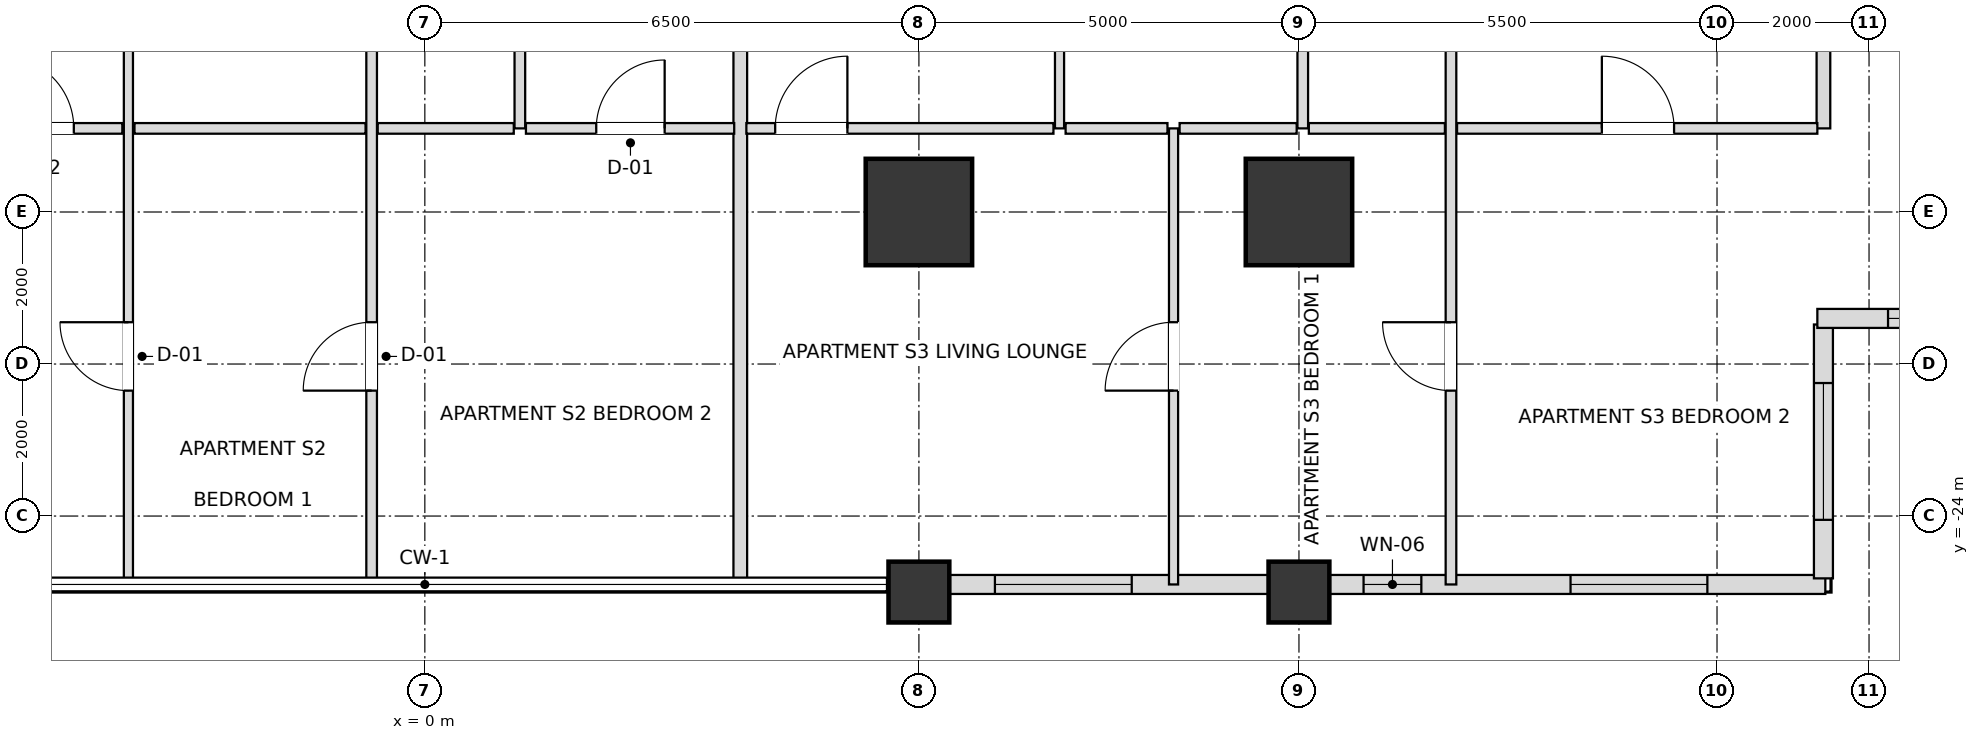
"""IFC4 building model, lengths in metres.
Left out: names, types, materials, properties, quantities, classifications, styles, units other than length and angle.
Written with IfcOpenShell. Run it as: python <this file> out.ifc"""

import sys

from ifc_helpers import new_model, si_unit, direction, frame, frame_2d, origin, origin_2d, place, context, subcontext, project, spatial, rectangle, extrude, element, fill, save


model = new_model("IFC4")
c1 = context("Model", 3, precision=1e-05, world=origin(), true_north=direction((0.0, 1.0)))
c2 = subcontext(c1, "Body", "Model", "MODEL_VIEW")
j1 = project(units=[si_unit("LENGTHUNIT", "METRE"), si_unit("PLANEANGLEUNIT", "RADIAN")], contexts=[c1])
p1 = place(None, origin())
s1 = spatial("IfcSite", under=j1, at=p1, CompositionType="ELEMENT")
p2 = place(p1, origin())
s2 = spatial("IfcBuilding", under=s1, at=p2, CompositionType="ELEMENT")
p3 = place(p2, frame((0.0, 0.0, 32.4)))
s3 = spatial("IfcBuildingStorey", under=s2, at=p3, CompositionType="ELEMENT", Elevation=32.4)
for number, where, z_axis, x_axis in (
    (1, (6.5, -20.0, 0.0), (0.0, 0.0, 1.0), (1.0, 0.0, 0.0)),
    (2, (11.5, -20.0, 0.0), (0.0, 0.0, 1.0), (1.0, 0.0, 0.0)),
):
    element("IfcColumn", number, at=place(p3, frame(where, z_axis=z_axis, x_axis=x_axis)), inside=s3, PredefinedType="USERDEFINED", context=c2, shape_type="SweptSolid", body=[
        extrude(rectangle(XDim=1.4, YDim=1.4, at=origin_2d()), origin(), (0.0, 0.0, 1.0), 3.6),
    ])
for number, where, z_axis, x_axis in (
    (3, (6.5, -25.0, 0.0), (0.0, 0.0, 1.0), (1.0, 0.0, 0.0)),
    (4, (11.5, -25.0, 0.0), (0.0, 0.0, 1.0), (1.0, 0.0, 0.0)),
):
    element("IfcColumn", number, at=place(p3, frame(where, z_axis=z_axis, x_axis=x_axis)), inside=s3, PredefinedType="COLUMN", context=c2, shape_type="SweptSolid", body=[
        extrude(rectangle(XDim=0.8, YDim=0.8, at=origin_2d()), origin(), (0.0, 0.0, 1.0), 3.6),
    ])
p4 = place(p3, frame((6.895, -24.9, 0.0), z_axis=(0.0, 0.0, 1.0), x_axis=(1.0, 0.0, 0.0)))
e5 = element("IfcWall", 5, at=p4, inside=s3, PredefinedType="SOLIDWALL", context=c2, shape_type="SweptSolid", body=[
    extrude(rectangle(XDim=4.21, YDim=0.25, at=frame_2d((2.105, 0.0))), origin(), (0.0, 0.0, 1.0), 2.736),
])
p5 = place(p4, frame((0.605, 0.0, 0.72)))
e6 = element("IfcOpeningElement", 6, at=p5, cuts=e5, PredefinedType="OPENING", context=c2, shape_type="SweptSolid", body=[
    extrude(rectangle(XDim=1.8, YDim=1.68, at=frame_2d((0.9, 0.84))), frame((0.0, 0.135, 0.0), z_axis=(0.0, -1.0, 0.0), x_axis=(1.0, 0.0, 0.0)), (0.0, 0.0, 1.0), 0.27),
])
p6 = place(p3, frame((11.895, -24.9, 0.0), z_axis=(0.0, 0.0, 1.0), x_axis=(1.0, 0.0, 0.0)))
e7 = element("IfcWall", 7, at=p6, inside=s3, PredefinedType="SOLIDWALL", context=c2, shape_type="SweptSolid", body=[
    extrude(rectangle(XDim=6.53, YDim=0.25, at=frame_2d((3.265, 0.0))), origin(), (0.0, 0.0, 1.0), 2.736),
])
p7 = place(p6, frame((0.455, 0.0, 0.72)))
e8 = element("IfcOpeningElement", 8, at=p7, cuts=e7, PredefinedType="OPENING", context=c2, shape_type="SweptSolid", body=[
    extrude(rectangle(XDim=0.76, YDim=1.68, at=frame_2d((0.38, 0.84))), frame((0.0, 0.135, 0.0), z_axis=(0.0, -1.0, 0.0), x_axis=(1.0, 0.0, 0.0)), (0.0, 0.0, 1.0), 0.27),
])
p8 = place(p6, frame((3.178, 0.0, 0.72)))
e9 = element("IfcOpeningElement", 9, at=p8, cuts=e7, PredefinedType="OPENING", context=c2, shape_type="SweptSolid", body=[
    extrude(rectangle(XDim=1.8, YDim=1.68, at=frame_2d((0.9, 0.84))), frame((0.0, 0.135, 0.0), z_axis=(0.0, -1.0, 0.0), x_axis=(1.0, 0.0, 0.0)), (0.0, 0.0, 1.0), 0.27),
])
p9 = place(p3, frame((18.4, -24.82, 0.0), z_axis=(0.0, 0.0, 1.0), x_axis=(0.0, 1.0, 0.0)))
e10 = element("IfcWall", 10, at=p9, inside=s3, PredefinedType="SOLIDWALL", context=c2, shape_type="SweptSolid", body=[
    extrude(rectangle(XDim=3.34, YDim=0.25, at=frame_2d((1.67, 0.0))), origin(), (0.0, 0.0, 1.0), 2.736),
])
p10 = place(p9, frame((0.77, 0.0, 0.72)))
e11 = element("IfcOpeningElement", 11, at=p10, cuts=e10, PredefinedType="OPENING", context=c2, shape_type="SweptSolid", body=[
    extrude(rectangle(XDim=1.8, YDim=1.68, at=frame_2d((0.9, 0.84))), frame((0.0, 0.135, 0.0), z_axis=(0.0, -1.0, 0.0), x_axis=(1.0, 0.0, 0.0)), (0.0, 0.0, 1.0), 0.27),
])
p11 = place(p3, frame((18.32, -21.4, 0.0), z_axis=(0.0, 0.0, 1.0), x_axis=(1.0, 0.0, 0.0)))
e12 = element("IfcWall", 12, at=p11, inside=s3, PredefinedType="SOLIDWALL", context=c2, shape_type="SweptSolid", body=[
    extrude(rectangle(XDim=3.66, YDim=0.25, at=frame_2d((1.83, 0.0))), origin(), (0.0, 0.0, 1.0), 2.736),
])
p12 = place(p11, frame((0.93, 0.0, 0.72)))
e13 = element("IfcOpeningElement", 13, at=p12, cuts=e12, PredefinedType="OPENING", context=c2, shape_type="SweptSolid", body=[
    extrude(rectangle(XDim=1.8, YDim=1.68, at=frame_2d((0.9, 0.84))), frame((0.0, 0.135, 0.0), z_axis=(0.0, -1.0, 0.0), x_axis=(1.0, 0.0, 0.0)), (0.0, 0.0, 1.0), 0.27),
])
p13 = place(p3, frame((-3.9, -24.9, 0.0), z_axis=(0.0, 0.0, 1.0), x_axis=(0.0, 1.0, 0.0)))
e14 = element("IfcWall", 14, at=p13, inside=s3, PredefinedType="PARTITIONING", context=c2, shape_type="SweptSolid", body=[
    extrude(rectangle(XDim=15.6, YDim=0.12, at=frame_2d((7.8, 0.0))), origin(), (0.0, 0.0, 1.0), 2.816),
])
p14 = place(p13, frame((10.325, 0.0, 0.0)))
e15 = element("IfcOpeningElement", 15, at=p14, cuts=e14, PredefinedType="OPENING", context=c2, shape_type="SweptSolid", body=[
    extrude(rectangle(XDim=0.95, YDim=2.1, at=frame_2d((0.475, 1.05))), frame((0.0, 0.07, 0.0), z_axis=(0.0, -1.0, 0.0), x_axis=(1.0, 0.0, 0.0)), (0.0, 0.0, 1.0), 0.14),
])
p15 = place(p13, frame((2.55, 0.0, 0.0)))
e16 = element("IfcOpeningElement", 16, at=p15, cuts=e14, PredefinedType="OPENING", context=c2, shape_type="SweptSolid", body=[
    extrude(rectangle(XDim=0.9, YDim=2.1, at=frame_2d((0.45, 1.05))), frame((0.0, 0.07, 0.0), z_axis=(0.0, -1.0, 0.0), x_axis=(1.0, 0.0, 0.0)), (0.0, 0.0, 1.0), 0.14),
])
p16 = place(p3, frame((-0.7, -24.9, 0.0), z_axis=(0.0, 0.0, 1.0), x_axis=(0.0, 1.0, 0.0)))
e17 = element("IfcWall", 17, at=p16, inside=s3, PredefinedType="PARTITIONING", context=c2, shape_type="SweptSolid", body=[
    extrude(rectangle(XDim=15.6, YDim=0.14, at=frame_2d((7.8, 0.0))), origin(), (0.0, 0.0, 1.0), 2.816),
])
p17 = place(p16, frame((10.35, 0.0, 0.0)))
e18 = element("IfcOpeningElement", 18, at=p17, cuts=e17, PredefinedType="OPENING", context=c2, shape_type="SweptSolid", body=[
    extrude(rectangle(XDim=0.9, YDim=2.1, at=frame_2d((0.45, 1.05))), frame((0.0, 0.08, 0.0), z_axis=(0.0, -1.0, 0.0), x_axis=(1.0, 0.0, 0.0)), (0.0, 0.0, 1.0), 0.16),
])
p18 = place(p16, frame((2.55, 0.0, 0.0)))
e19 = element("IfcOpeningElement", 19, at=p18, cuts=e17, PredefinedType="OPENING", context=c2, shape_type="SweptSolid", body=[
    extrude(rectangle(XDim=0.9, YDim=2.1, at=frame_2d((0.45, 1.05))), frame((0.0, 0.08, 0.0), z_axis=(0.0, -1.0, 0.0), x_axis=(1.0, 0.0, 0.0)), (0.0, 0.0, 1.0), 0.16),
])
p19 = place(p3, frame((1.25, -18.9, 0.0), z_axis=(0.0, 0.0, 1.0), x_axis=(0.0, 1.0, 0.0)))
e20 = element("IfcWall", 20, at=p19, inside=s3, PredefinedType="PARTITIONING", context=c2, shape_type="SweptSolid", body=[
    extrude(rectangle(XDim=9.6, YDim=0.14, at=frame_2d((4.8, 0.0))), origin(), (0.0, 0.0, 1.0), 2.948),
])
p20 = place(p3, frame((4.15, -24.9, 0.0), z_axis=(0.0, 0.0, 1.0), x_axis=(0.0, 1.0, 0.0)))
e21 = element("IfcWall", 21, at=p20, inside=s3, PredefinedType="PARTITIONING", context=c2, shape_type="SweptSolid", body=[
    extrude(rectangle(XDim=15.6, YDim=0.18, at=frame_2d((7.8, 0.0))), origin(), (0.0, 0.0, 1.0), 2.816),
])
p21 = place(p3, frame((8.35, -18.9, 0.0), z_axis=(0.0, 0.0, 1.0), x_axis=(0.0, 1.0, 0.0)))
e22 = element("IfcWall", 22, at=p21, inside=s3, PredefinedType="PARTITIONING", context=c2, shape_type="SweptSolid", body=[
    extrude(rectangle(XDim=9.6, YDim=0.12, at=frame_2d((4.8, 0.0))), origin(), (0.0, 0.0, 1.0), 2.816),
])
p22 = place(p21, frame((4.325, 0.0, 0.0)))
e23 = element("IfcOpeningElement", 23, at=p22, cuts=e22, PredefinedType="OPENING", context=c2, shape_type="SweptSolid", body=[
    extrude(rectangle(XDim=0.95, YDim=2.1, at=frame_2d((0.475, 1.05))), frame((0.0, 0.07, 0.0), z_axis=(0.0, -1.0, 0.0), x_axis=(1.0, 0.0, 0.0)), (0.0, 0.0, 1.0), 0.14),
])
p23 = place(p3, frame((9.85, -24.9, 0.0), z_axis=(0.0, 0.0, 1.0), x_axis=(0.0, 1.0, 0.0)))
e24 = element("IfcWall", 24, at=p23, inside=s3, PredefinedType="PARTITIONING", context=c2, shape_type="SweptSolid", body=[
    extrude(rectangle(XDim=6.0, YDim=0.12, at=frame_2d((3.0, 0.0))), origin(), (0.0, 0.0, 1.0), 2.816),
])
p24 = place(p23, frame((2.55, 0.0, 0.0)))
e25 = element("IfcOpeningElement", 25, at=p24, cuts=e24, PredefinedType="OPENING", context=c2, shape_type="SweptSolid", body=[
    extrude(rectangle(XDim=0.9, YDim=2.1, at=frame_2d((0.45, 1.05))), frame((0.0, 0.07, 0.0), z_axis=(0.0, -1.0, 0.0), x_axis=(1.0, 0.0, 0.0)), (0.0, 0.0, 1.0), 0.14),
])
p25 = place(p3, frame((11.55, -18.9, 0.0), z_axis=(0.0, 0.0, 1.0), x_axis=(0.0, 1.0, 0.0)))
e26 = element("IfcWall", 26, at=p25, inside=s3, PredefinedType="PARTITIONING", context=c2, shape_type="SweptSolid", body=[
    extrude(rectangle(XDim=9.6, YDim=0.14, at=frame_2d((4.8, 0.0))), origin(), (0.0, 0.0, 1.0), 2.736),
])
p26 = place(p25, frame((4.35, 0.0, 0.0)))
e27 = element("IfcOpeningElement", 27, at=p26, cuts=e26, PredefinedType="OPENING", context=c2, shape_type="SweptSolid", body=[
    extrude(rectangle(XDim=0.9, YDim=2.1, at=frame_2d((0.45, 1.05))), frame((0.0, 0.08, 0.0), z_axis=(0.0, -1.0, 0.0), x_axis=(1.0, 0.0, 0.0)), (0.0, 0.0, 1.0), 0.16),
])
p27 = place(p3, frame((13.5, -24.9, 0.0), z_axis=(0.0, 0.0, 1.0), x_axis=(0.0, 1.0, 0.0)))
e28 = element("IfcWall", 28, at=p27, inside=s3, PredefinedType="PARTITIONING", context=c2, shape_type="SweptSolid", body=[
    extrude(rectangle(XDim=15.6, YDim=0.14, at=frame_2d((7.8, 0.0))), origin(), (0.0, 0.0, 1.0), 2.736),
])
p28 = place(p27, frame((2.55, 0.0, 0.0)))
e29 = element("IfcOpeningElement", 29, at=p28, cuts=e28, PredefinedType="OPENING", context=c2, shape_type="SweptSolid", body=[
    extrude(rectangle(XDim=0.9, YDim=2.1, at=frame_2d((0.45, 1.05))), frame((0.0, 0.08, 0.0), z_axis=(0.0, -1.0, 0.0), x_axis=(1.0, 0.0, 0.0)), (0.0, 0.0, 1.0), 0.16),
])
p29 = place(p3, frame((18.4, -18.9, 0.0), z_axis=(0.0, 0.0, 1.0), x_axis=(0.0, 1.0, 0.0)))
e30 = element("IfcWall", 30, at=p29, inside=s3, PredefinedType="PARTITIONING", context=c2, shape_type="SweptSolid", body=[
    extrude(rectangle(XDim=9.6, YDim=0.18, at=frame_2d((4.8, 0.0))), origin(), (0.0, 0.0, 1.0), 2.736),
])
p30 = place(p3, frame((-8.02, -18.9, 0.0), z_axis=(0.0, 0.0, 1.0), x_axis=(1.0, 0.0, 0.0)))
e31 = element("IfcWall", 31, at=p30, inside=s3, PredefinedType="PARTITIONING", context=c2, shape_type="SweptSolid", body=[
    extrude(rectangle(XDim=4.04, YDim=0.14, at=frame_2d((2.02, 0.0))), origin(), (0.0, 0.0, 1.0), 2.816),
])
p31 = place(p30, frame((2.452, 0.0, 0.0)))
e32 = element("IfcOpeningElement", 32, at=p31, cuts=e31, PredefinedType="OPENING", context=c2, shape_type="SweptSolid", body=[
    extrude(rectangle(XDim=0.95, YDim=2.1, at=frame_2d((0.475, 1.05))), frame((0.0, 0.08, 0.0), z_axis=(0.0, -1.0, 0.0), x_axis=(1.0, 0.0, 0.0)), (0.0, 0.0, 1.0), 0.16),
])
p32 = place(p3, frame((-3.82, -18.9, 0.0), z_axis=(0.0, 0.0, 1.0), x_axis=(1.0, 0.0, 0.0)))
e33 = element("IfcWall", 33, at=p32, inside=s3, PredefinedType="PARTITIONING", context=c2, shape_type="SweptSolid", body=[
    extrude(rectangle(XDim=3.04, YDim=0.14, at=frame_2d((1.52, 0.0))), origin(), (0.0, 0.0, 1.0), 3.38),
])
p33 = place(p3, frame((-0.62, -18.9, 0.0), z_axis=(0.0, 0.0, 1.0), x_axis=(1.0, 0.0, 0.0)))
e34 = element("IfcWall", 34, at=p33, inside=s3, PredefinedType="PARTITIONING", context=c2, shape_type="SweptSolid", body=[
    extrude(rectangle(XDim=1.79, YDim=0.14, at=frame_2d((0.895, 0.0))), origin(), (0.0, 0.0, 1.0), 3.38),
])
p34 = place(p3, frame((1.33, -18.9, 0.0), z_axis=(0.0, 0.0, 1.0), x_axis=(1.0, 0.0, 0.0)))
e35 = element("IfcWall", 35, at=p34, inside=s3, PredefinedType="PARTITIONING", context=c2, shape_type="SweptSolid", body=[
    extrude(rectangle(XDim=2.74, YDim=0.14, at=frame_2d((1.37, 0.0))), origin(), (0.0, 0.0, 1.0), 3.38),
])
p35 = place(p34, frame((0.925, 0.0, 0.0)))
e36 = element("IfcOpeningElement", 36, at=p35, cuts=e35, PredefinedType="OPENING", context=c2, shape_type="SweptSolid", body=[
    extrude(rectangle(XDim=0.9, YDim=2.1, at=frame_2d((0.45, 1.05))), frame((0.0, 0.08, 0.0), z_axis=(0.0, -1.0, 0.0), x_axis=(1.0, 0.0, 0.0)), (0.0, 0.0, 1.0), 0.16),
])
p36 = place(p3, frame((4.23, -18.9, 0.0), z_axis=(0.0, 0.0, 1.0), x_axis=(1.0, 0.0, 0.0)))
e37 = element("IfcWall", 37, at=p36, inside=s3, PredefinedType="PARTITIONING", context=c2, shape_type="SweptSolid", body=[
    extrude(rectangle(XDim=4.04, YDim=0.14, at=frame_2d((2.02, 0.0))), origin(), (0.0, 0.0, 1.0), 2.816),
])
p37 = place(p36, frame((0.379, 0.0, 0.0)))
e38 = element("IfcOpeningElement", 38, at=p37, cuts=e37, PredefinedType="OPENING", context=c2, shape_type="SweptSolid", body=[
    extrude(rectangle(XDim=0.95, YDim=2.1, at=frame_2d((0.475, 1.05))), frame((0.0, 0.08, 0.0), z_axis=(0.0, -1.0, 0.0), x_axis=(1.0, 0.0, 0.0)), (0.0, 0.0, 1.0), 0.16),
])
p38 = place(p3, frame((8.43, -18.9, 0.0), z_axis=(0.0, 0.0, 1.0), x_axis=(1.0, 0.0, 0.0)))
e39 = element("IfcWall", 39, at=p38, inside=s3, PredefinedType="PARTITIONING", context=c2, shape_type="SweptSolid", body=[
    extrude(rectangle(XDim=1.34, YDim=0.14, at=frame_2d((0.67, 0.0))), origin(), (0.0, 0.0, 1.0), 3.38),
])
p39 = place(p3, frame((9.93, -18.9, 0.0), z_axis=(0.0, 0.0, 1.0), x_axis=(1.0, 0.0, 0.0)))
e40 = element("IfcWall", 40, at=p39, inside=s3, PredefinedType="PARTITIONING", context=c2, shape_type="SweptSolid", body=[
    extrude(rectangle(XDim=1.54, YDim=0.14, at=frame_2d((0.77, 0.0))), origin(), (0.0, 0.0, 1.0), 3.38),
])
p40 = place(p3, frame((11.63, -18.9, 0.0), z_axis=(0.0, 0.0, 1.0), x_axis=(1.0, 0.0, 0.0)))
e41 = element("IfcWall", 41, at=p40, inside=s3, PredefinedType="PARTITIONING", context=c2, shape_type="SweptSolid", body=[
    extrude(rectangle(XDim=1.79, YDim=0.14, at=frame_2d((0.895, 0.0))), origin(), (0.0, 0.0, 1.0), 2.736),
])
p41 = place(p3, frame((13.58, -18.9, 0.0), z_axis=(0.0, 0.0, 1.0), x_axis=(1.0, 0.0, 0.0)))
e42 = element("IfcWall", 42, at=p41, inside=s3, PredefinedType="PARTITIONING", context=c2, shape_type="SweptSolid", body=[
    extrude(rectangle(XDim=4.74, YDim=0.14, at=frame_2d((2.37, 0.0))), origin(), (0.0, 0.0, 1.0), 2.736),
])
p42 = place(p41, frame((1.905, 0.0, 0.0)))
e43 = element("IfcOpeningElement", 43, at=p42, cuts=e42, PredefinedType="OPENING", context=c2, shape_type="SweptSolid", body=[
    extrude(rectangle(XDim=0.95, YDim=2.1, at=frame_2d((0.475, 1.05))), frame((0.0, 0.08, 0.0), z_axis=(0.0, -1.0, 0.0), x_axis=(1.0, 0.0, 0.0)), (0.0, 0.0, 1.0), 0.16),
])
p43 = place(p5, origin())
e44 = element("IfcWindow", 44, at=p43, inside=s3, PartitioningType="SINGLE_PANEL", PredefinedType="WINDOW", context=c2, shape_type="SweptSolid", body=[
    extrude(rectangle(XDim=1.8, YDim=1.68, at=frame_2d((0.9, 0.84))), frame((0.0, 0.03, 0.0), z_axis=(0.0, -1.0, 0.0), x_axis=(1.0, 0.0, 0.0)), (0.0, 0.0, 1.0), 0.06),
])
fill(e6, e44)
p44 = place(p7, origin())
e45 = element("IfcWindow", 45, at=p44, inside=s3, PartitioningType="SINGLE_PANEL", PredefinedType="WINDOW", context=c2, shape_type="SweptSolid", body=[
    extrude(rectangle(XDim=0.76, YDim=1.68, at=frame_2d((0.38, 0.84))), frame((0.0, 0.03, 0.0), z_axis=(0.0, -1.0, 0.0), x_axis=(1.0, 0.0, 0.0)), (0.0, 0.0, 1.0), 0.06),
])
fill(e8, e45)
p45 = place(p8, origin())
e46 = element("IfcWindow", 46, at=p45, inside=s3, PartitioningType="SINGLE_PANEL", PredefinedType="WINDOW", context=c2, shape_type="SweptSolid", body=[
    extrude(rectangle(XDim=1.8, YDim=1.68, at=frame_2d((0.9, 0.84))), frame((0.0, 0.03, 0.0), z_axis=(0.0, -1.0, 0.0), x_axis=(1.0, 0.0, 0.0)), (0.0, 0.0, 1.0), 0.06),
])
fill(e9, e46)
p46 = place(p10, origin())
e47 = element("IfcWindow", 47, at=p46, inside=s3, PartitioningType="SINGLE_PANEL", PredefinedType="WINDOW", context=c2, shape_type="SweptSolid", body=[
    extrude(rectangle(XDim=1.8, YDim=1.68, at=frame_2d((0.9, 0.84))), frame((0.0, 0.03, 0.0), z_axis=(0.0, -1.0, 0.0), x_axis=(1.0, 0.0, 0.0)), (0.0, 0.0, 1.0), 0.06),
])
fill(e11, e47)
p47 = place(p12, origin())
e48 = element("IfcWindow", 48, at=p47, inside=s3, PartitioningType="SINGLE_PANEL", PredefinedType="WINDOW", context=c2, shape_type="SweptSolid", body=[
    extrude(rectangle(XDim=1.8, YDim=1.68, at=frame_2d((0.9, 0.84))), frame((0.0, 0.03, 0.0), z_axis=(0.0, -1.0, 0.0), x_axis=(1.0, 0.0, 0.0)), (0.0, 0.0, 1.0), 0.06),
])
fill(e13, e48)
p48 = place(p35, origin())
e49 = element("IfcDoor", 49, at=p48, inside=s3, OperationType="SINGLE_SWING_RIGHT", PredefinedType="DOOR", context=c2, shape_type="SweptSolid", body=[
    extrude(rectangle(XDim=0.9, YDim=2.1, at=frame_2d((0.45, 1.05))), frame((0.0, 0.025, 0.0), z_axis=(0.0, -1.0, 0.0), x_axis=(1.0, 0.0, 0.0)), (0.0, 0.0, 1.0), 0.05),
])
fill(e36, e49)
p49 = place(p31, origin())
e50 = element("IfcDoor", 50, at=p49, inside=s3, OperationType="SINGLE_SWING_LEFT", PredefinedType="DOOR", context=c2, shape_type="SweptSolid", body=[
    extrude(rectangle(XDim=0.95, YDim=2.1, at=frame_2d((0.475, 1.05))), frame((0.0, 0.025, 0.0), z_axis=(0.0, -1.0, 0.0), x_axis=(1.0, 0.0, 0.0)), (0.0, 0.0, 1.0), 0.05),
])
fill(e32, e50)
p50 = place(p15, origin())
e51 = element("IfcDoor", 51, at=p50, inside=s3, OperationType="SINGLE_SWING_RIGHT", PredefinedType="DOOR", context=c2, shape_type="SweptSolid", body=[
    extrude(rectangle(XDim=0.9, YDim=2.1, at=frame_2d((0.45, 1.05))), frame((0.0, 0.025, 0.0), z_axis=(0.0, -1.0, 0.0), x_axis=(1.0, 0.0, 0.0)), (0.0, 0.0, 1.0), 0.05),
])
fill(e16, e51)
p51 = place(p18, origin())
e52 = element("IfcDoor", 52, at=p51, inside=s3, OperationType="SINGLE_SWING_LEFT", PredefinedType="DOOR", context=c2, shape_type="SweptSolid", body=[
    extrude(rectangle(XDim=0.9, YDim=2.1, at=frame_2d((0.45, 1.05))), frame((0.0, 0.025, 0.0), z_axis=(0.0, -1.0, 0.0), x_axis=(1.0, 0.0, 0.0)), (0.0, 0.0, 1.0), 0.05),
])
fill(e19, e52)
p52 = place(p42, origin())
e53 = element("IfcDoor", 53, at=p52, inside=s3, OperationType="SINGLE_SWING_LEFT", PredefinedType="DOOR", context=c2, shape_type="SweptSolid", body=[
    extrude(rectangle(XDim=0.95, YDim=2.1, at=frame_2d((0.475, 1.05))), frame((0.0, 0.025, 0.0), z_axis=(0.0, -1.0, 0.0), x_axis=(1.0, 0.0, 0.0)), (0.0, 0.0, 1.0), 0.05),
])
fill(e43, e53)
p53 = place(p37, origin())
e54 = element("IfcDoor", 54, at=p53, inside=s3, OperationType="SINGLE_SWING_RIGHT", PredefinedType="DOOR", context=c2, shape_type="SweptSolid", body=[
    extrude(rectangle(XDim=0.95, YDim=2.1, at=frame_2d((0.475, 1.05))), frame((0.0, 0.025, 0.0), z_axis=(0.0, -1.0, 0.0), x_axis=(1.0, 0.0, 0.0)), (0.0, 0.0, 1.0), 0.05),
])
fill(e38, e54)
p54 = place(p24, origin())
e55 = element("IfcDoor", 55, at=p54, inside=s3, OperationType="SINGLE_SWING_LEFT", PredefinedType="DOOR", context=c2, shape_type="SweptSolid", body=[
    extrude(rectangle(XDim=0.9, YDim=2.1, at=frame_2d((0.45, 1.05))), frame((0.0, 0.025, 0.0), z_axis=(0.0, -1.0, 0.0), x_axis=(1.0, 0.0, 0.0)), (0.0, 0.0, 1.0), 0.05),
])
fill(e25, e55)
p55 = place(p28, origin())
e56 = element("IfcDoor", 56, at=p55, inside=s3, OperationType="SINGLE_SWING_RIGHT", PredefinedType="DOOR", context=c2, shape_type="SweptSolid", body=[
    extrude(rectangle(XDim=0.9, YDim=2.1, at=frame_2d((0.45, 1.05))), frame((0.0, 0.025, 0.0), z_axis=(0.0, -1.0, 0.0), x_axis=(1.0, 0.0, 0.0)), (0.0, 0.0, 1.0), 0.05),
])
fill(e29, e56)
save(model, sys.argv[1])
